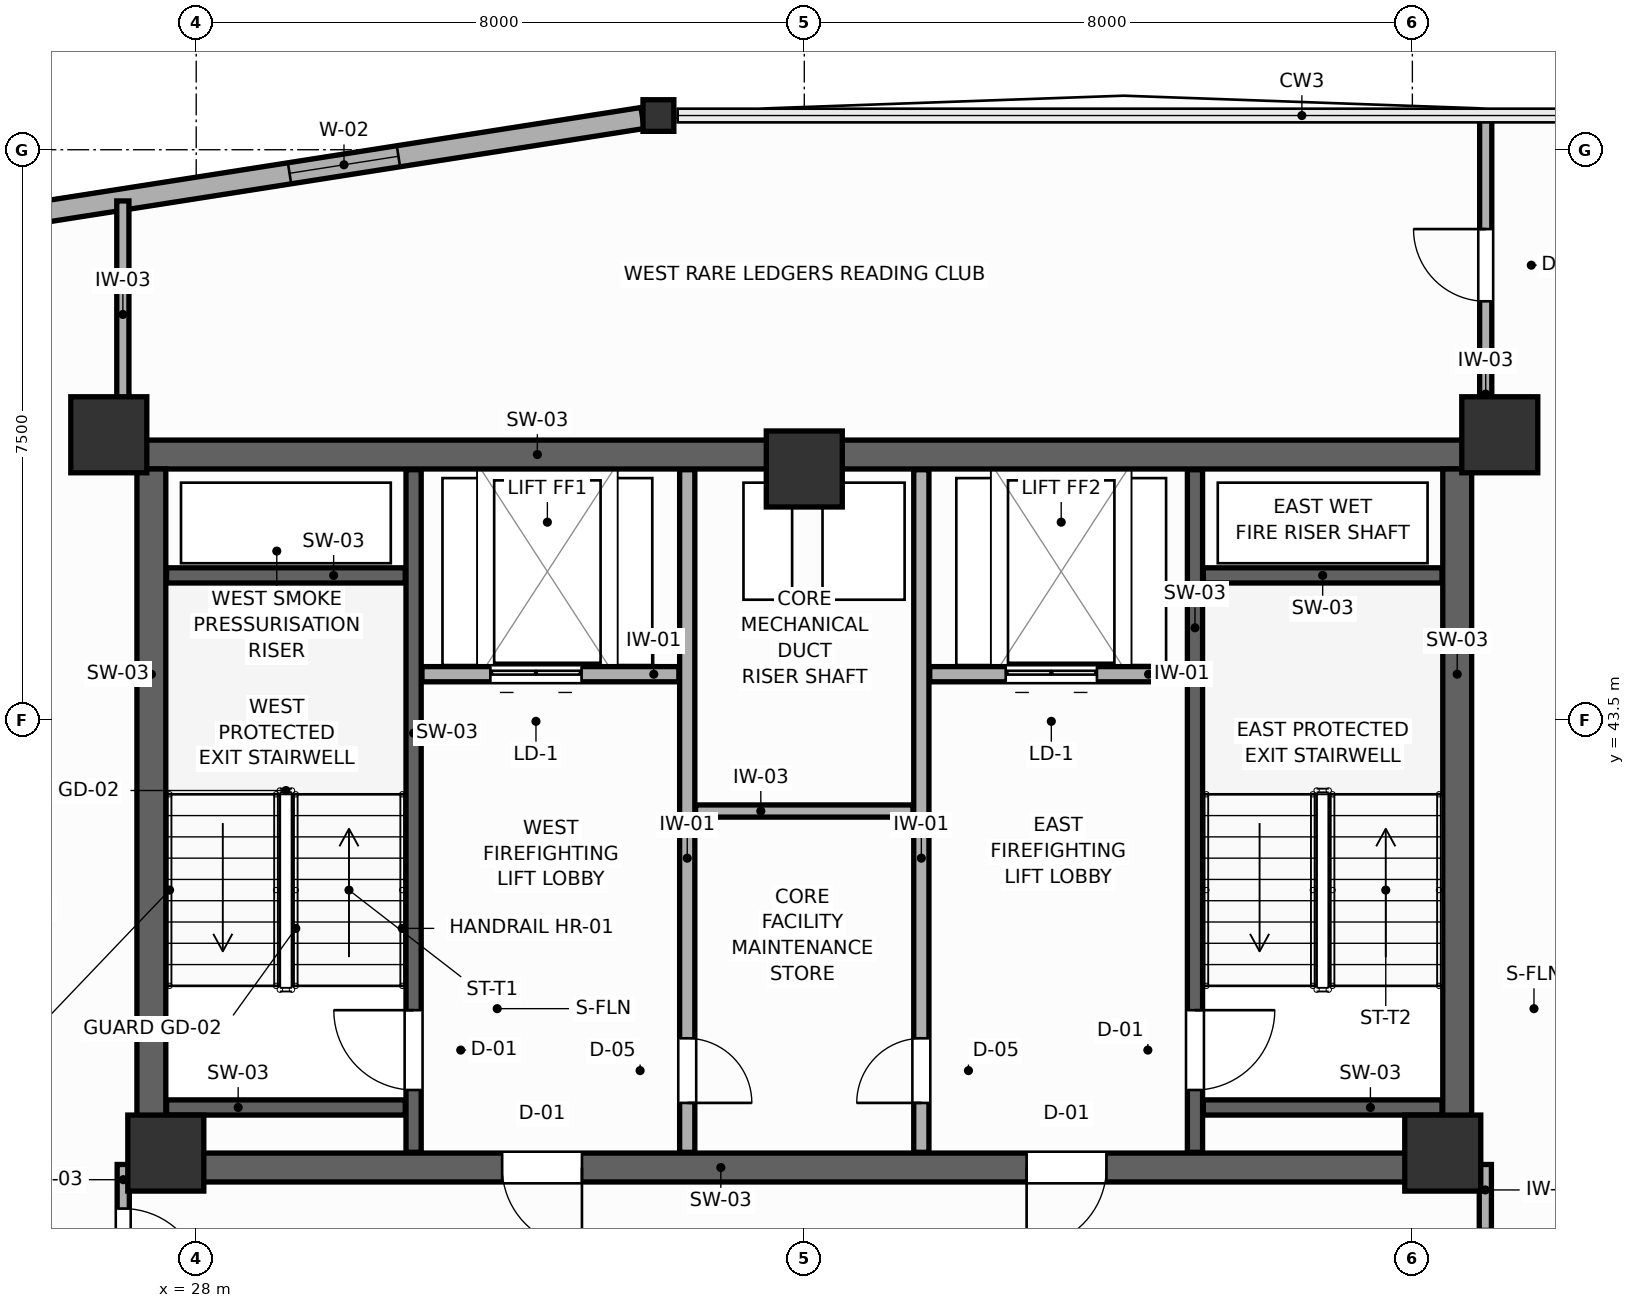
"""IFC4 building model, lengths in metres.
Left out: names, types, materials, properties, quantities, classifications, styles, units other than length and angle.
Written with IfcOpenShell. Run it as: python <this file> out.ifc"""

import sys

from ifc_helpers import new_model, si_unit, direction, frame, frame_2d, origin, origin_2d, place, context, subcontext, project, spatial, rectangle, i_section, extrude, source, transform, mapped, element, fill, save


model = new_model("IFC4")
c1 = context("Model", 3, precision=1e-05, world=origin(), true_north=direction((0.0, 1.0)))
c2 = subcontext(c1, "Body", "Model", "MODEL_VIEW")
j1 = project(units=[si_unit("LENGTHUNIT", "METRE"), si_unit("PLANEANGLEUNIT", "RADIAN")], contexts=[c1])
p1 = place(None, origin())
s1 = spatial("IfcSite", under=j1, at=p1, CompositionType="ELEMENT")
p2 = place(p1, origin())
s2 = spatial("IfcBuilding", under=s1, at=p2, CompositionType="ELEMENT")
p3 = place(p2, frame((0.0, 0.0, 220.2)))
s3 = spatial("IfcBuildingStorey", under=s2, at=p3, CompositionType="ELEMENT", Elevation=220.2)
p4 = place(p3, frame((27.22, 46.99, 0.0), z_axis=(0.0, 0.0, 1.0), x_axis=(1.0, 0.0, 0.0)))
e1 = element("IfcWall", 1, at=p4, inside=s3, PredefinedType="SHEAR", context=c2, shape_type="SweptSolid", body=[
    extrude(rectangle(XDim=17.56, YDim=0.38, at=frame_2d((8.78, 0.0))), origin(), (0.0, 0.0, 1.0), 3.6),
])
p5 = place(p3, frame((27.22, 37.61, 0.0), z_axis=(0.0, 0.0, 1.0), x_axis=(1.0, 0.0, 0.0)))
e2 = element("IfcWall", 2, at=p5, inside=s3, PredefinedType="SHEAR", context=c2, shape_type="SweptSolid", body=[
    extrude(rectangle(XDim=17.56, YDim=0.38, at=frame_2d((8.78, 0.0))), origin(), (0.0, 0.0, 1.0), 3.6),
])
p6 = place(p5, frame((4.805, 0.0, 0.0)))
e3 = element("IfcOpeningElement", 3, at=p6, cuts=e2, PredefinedType="OPENING", context=c2, shape_type="SweptSolid", body=[
    extrude(rectangle(XDim=1.05, YDim=2.1, at=frame_2d((0.525, 1.05))), frame((0.0, 0.2, 0.0), z_axis=(0.0, -1.0, 0.0), x_axis=(1.0, 0.0, 0.0)), (0.0, 0.0, 1.0), 0.4),
])
p7 = place(p5, frame((11.705, 0.0, 0.0)))
e4 = element("IfcOpeningElement", 4, at=p7, cuts=e2, PredefinedType="OPENING", context=c2, shape_type="SweptSolid", body=[
    extrude(rectangle(XDim=1.05, YDim=2.1, at=frame_2d((0.525, 1.05))), frame((0.0, 0.2, 0.0), z_axis=(0.0, -1.0, 0.0), x_axis=(1.0, 0.0, 0.0)), (0.0, 0.0, 1.0), 0.4),
])
for number, where, z_axis, x_axis in (
    (5, (27.41, 37.8, 0.0), (0.0, 0.0, 1.0), (0.0, 1.0, 0.0)),
    (6, (44.59, 37.8, 0.0), (0.0, 0.0, 1.0), (0.0, 1.0, 0.0)),
):
    element("IfcWall", number, at=place(p3, frame(where, z_axis=z_axis, x_axis=x_axis)), inside=s3, PredefinedType="SHEAR", context=c2, shape_type="SweptSolid", body=[
        extrude(rectangle(XDim=9.0, YDim=0.38, at=frame_2d((4.5, 0.0))), origin(), (0.0, 0.0, 1.0), 3.6),
    ])
m1 = source(origin(), c2, "Body", "SweptSolid", [
    extrude(rectangle(XDim=1.0, YDim=1.0, at=origin_2d()), origin(), (0.0, 0.0, 1.0), 3.6),
])
for number, where, z_axis, x_axis in (
    (7, (26.85, 47.25, 0.0), (0.0, 0.0, 1.0), (1.0, 0.0, 0.0)),
    (8, (45.15, 47.25, 0.0), (0.0, 0.0, 1.0), (1.0, 0.0, 0.0)),
    (9, (27.6, 37.8, 0.0), (0.0, 0.0, 1.0), (1.0, 0.0, 0.0)),
    (10, (44.4, 37.8, 0.0), (0.0, 0.0, 1.0), (1.0, 0.0, 0.0)),
    (11, (36.0, 46.8, 0.0), (0.0, 0.0, 1.0), (1.0, 0.0, 0.0)),
):
    element("IfcColumn", number, at=place(p3, frame(where, z_axis=z_axis, x_axis=x_axis)), inside=s3, PredefinedType="COLUMN", context=c2, shape_type="MappedRepresentation", body=[
        mapped(m1, transform((0.0, 0.0, 0.0), scale=1.0)),
    ])
m2 = source(origin(), c2, "Body", "SweptSolid", [
    extrude(i_section(OverallWidth=0.406, OverallDepth=0.416, WebThickness=0.027, FlangeThickness=0.044, FilletRadius=0.015, at=origin_2d()), origin(), (0.0, 0.0, 1.0), 3.6),
])
p8 = place(p3, frame((34.081, 51.45, 0.0), z_axis=(0.0, 0.0, 1.0), x_axis=(1.0, 0.0, 0.0)))
e12 = element("IfcColumn", 12, at=p8, inside=s3, PredefinedType="COLUMN", context=c2, shape_type="MappedRepresentation", body=[
    mapped(m2, transform((0.0, 0.0, 0.0), scale=1.0)),
])
p9 = place(p3, frame((33.873, 51.417, 0.0), z_axis=(0.0, 0.0, 1.0), x_axis=(-0.987957437721, -0.154725890697, 0.0)))
e13 = element("IfcWall", 13, at=p9, inside=s3, PredefinedType="SOLIDWALL", context=c2, shape_type="SweptSolid", body=[
    extrude(rectangle(XDim=13.657, YDim=0.28, at=frame_2d((6.828, 0.0))), origin(), (0.0, 0.0, 1.0), 2.96),
])
p10 = place(p9, frame((3.252, 0.0, 0.75)))
e14 = element("IfcOpeningElement", 14, at=p10, cuts=e13, PredefinedType="OPENING", context=c2, shape_type="SweptSolid", body=[
    extrude(rectangle(XDim=1.45, YDim=1.65, at=frame_2d((0.725, 0.825))), frame((0.0, 0.15, 0.0), z_axis=(0.0, -1.0, 0.0), x_axis=(1.0, 0.0, 0.0)), (0.0, 0.0, 1.0), 0.3),
])
p11 = place(p3, frame((30.86, 37.81, 0.0), z_axis=(0.0, 0.0, 1.0), x_axis=(0.0, 1.0, 0.0)))
e15 = element("IfcWall", 15, at=p11, inside=s3, PredefinedType="SHEAR", context=c2, shape_type="SweptSolid", body=[
    extrude(rectangle(XDim=8.98, YDim=0.2, at=frame_2d((4.49, 0.0))), origin(), (0.0, 0.0, 1.0), 3.6),
])
p12 = place(p11, frame((0.82, 0.0, 0.0)))
e16 = element("IfcOpeningElement", 16, at=p12, cuts=e15, PredefinedType="OPENING", context=c2, shape_type="SweptSolid", body=[
    extrude(rectangle(XDim=1.05, YDim=2.1, at=frame_2d((0.525, 1.05))), frame((0.0, 0.11, 0.0), z_axis=(0.0, -1.0, 0.0), x_axis=(1.0, 0.0, 0.0)), (0.0, 0.0, 1.0), 0.22),
])
for number, where, z_axis, x_axis in (
    (17, (27.61, 45.4, 0.0), (0.0, 0.0, 1.0), (1.0, 0.0, 0.0)),
    (18, (27.61, 38.4, 0.0), (0.0, 0.0, 1.0), (1.0, 0.0, 0.0)),
):
    element("IfcWall", number, at=place(p3, frame(where, z_axis=z_axis, x_axis=x_axis)), inside=s3, PredefinedType="SHEAR", context=c2, shape_type="SweptSolid", body=[
        extrude(rectangle(XDim=3.14, YDim=0.2, at=frame_2d((1.57, 0.0))), origin(), (0.0, 0.0, 1.0), 3.6),
    ])
p13 = place(p3, frame((41.14, 37.81, 0.0), z_axis=(0.0, 0.0, 1.0), x_axis=(0.0, 1.0, 0.0)))
e19 = element("IfcWall", 19, at=p13, inside=s3, PredefinedType="SHEAR", context=c2, shape_type="SweptSolid", body=[
    extrude(rectangle(XDim=8.98, YDim=0.2, at=frame_2d((4.49, 0.0))), origin(), (0.0, 0.0, 1.0), 3.6),
])
p14 = place(p13, frame((0.82, 0.0, 0.0)))
e20 = element("IfcOpeningElement", 20, at=p14, cuts=e19, PredefinedType="OPENING", context=c2, shape_type="SweptSolid", body=[
    extrude(rectangle(XDim=1.05, YDim=2.1, at=frame_2d((0.525, 1.05))), frame((0.0, 0.11, 0.0), z_axis=(0.0, -1.0, 0.0), x_axis=(1.0, 0.0, 0.0)), (0.0, 0.0, 1.0), 0.22),
])
for number, where, z_axis, x_axis in (
    (21, (41.25, 45.4, 0.0), (0.0, 0.0, 1.0), (1.0, 0.0, 0.0)),
    (22, (41.25, 38.4, 0.0), (0.0, 0.0, 1.0), (1.0, 0.0, 0.0)),
):
    element("IfcWall", number, at=place(p3, frame(where, z_axis=z_axis, x_axis=x_axis)), inside=s3, PredefinedType="SHEAR", context=c2, shape_type="SweptSolid", body=[
        extrude(rectangle(XDim=3.14, YDim=0.2, at=frame_2d((1.57, 0.0))), origin(), (0.0, 0.0, 1.0), 3.6),
    ])
p15 = place(p3, frame((30.97, 44.1, 0.0), z_axis=(0.0, 0.0, 1.0), x_axis=(1.0, 0.0, 0.0)))
e23 = element("IfcWall", 23, at=p15, inside=s3, PredefinedType="PARTITIONING", context=c2, shape_type="SweptSolid", body=[
    extrude(rectangle(XDim=3.38, YDim=0.2, at=frame_2d((1.69, 0.0))), origin(), (0.0, 0.0, 1.0), 3.41),
])
p16 = place(p15, frame((0.9, 0.0, 0.0)))
e24 = element("IfcOpeningElement", 24, at=p16, cuts=e23, PredefinedType="OPENING", context=c2, shape_type="SweptSolid", body=[
    extrude(rectangle(XDim=1.2, YDim=2.1, at=frame_2d((0.6, 1.05))), frame((0.0, 0.11, 0.0), z_axis=(0.0, -1.0, 0.0), x_axis=(1.0, 0.0, 0.0)), (0.0, 0.0, 1.0), 0.22),
])
p17 = place(p3, frame((37.65, 44.1, 0.0), z_axis=(0.0, 0.0, 1.0), x_axis=(1.0, 0.0, 0.0)))
e25 = element("IfcWall", 25, at=p17, inside=s3, PredefinedType="PARTITIONING", context=c2, shape_type="SweptSolid", body=[
    extrude(rectangle(XDim=3.38, YDim=0.2, at=frame_2d((1.69, 0.0))), origin(), (0.0, 0.0, 1.0), 3.41),
])
p18 = place(p17, frame((1.0, 0.0, 0.0)))
e26 = element("IfcOpeningElement", 26, at=p18, cuts=e25, PredefinedType="OPENING", context=c2, shape_type="SweptSolid", body=[
    extrude(rectangle(XDim=1.2, YDim=2.1, at=frame_2d((0.6, 1.05))), frame((0.0, 0.11, 0.0), z_axis=(0.0, -1.0, 0.0), x_axis=(1.0, 0.0, 0.0)), (0.0, 0.0, 1.0), 0.22),
])
p19 = place(p3, frame((34.46, 37.81, 0.0), z_axis=(0.0, 0.0, 1.0), x_axis=(0.0, 1.0, 0.0)))
e27 = element("IfcWall", 27, at=p19, inside=s3, PredefinedType="PARTITIONING", context=c2, shape_type="SweptSolid", body=[
    extrude(rectangle(XDim=8.98, YDim=0.2, at=frame_2d((4.49, 0.0))), origin(), (0.0, 0.0, 1.0), 3.41),
])
p20 = place(p19, frame((0.65, 0.0, 0.0)))
e28 = element("IfcOpeningElement", 28, at=p20, cuts=e27, PredefinedType="OPENING", context=c2, shape_type="SweptSolid", body=[
    extrude(rectangle(XDim=0.85, YDim=2.05, at=frame_2d((0.425, 1.025))), frame((0.0, 0.11, 0.0), z_axis=(0.0, -1.0, 0.0), x_axis=(1.0, 0.0, 0.0)), (0.0, 0.0, 1.0), 0.22),
])
p21 = place(p3, frame((37.54, 37.81, 0.0), z_axis=(0.0, 0.0, 1.0), x_axis=(0.0, 1.0, 0.0)))
e29 = element("IfcWall", 29, at=p21, inside=s3, PredefinedType="PARTITIONING", context=c2, shape_type="SweptSolid", body=[
    extrude(rectangle(XDim=8.98, YDim=0.2, at=frame_2d((4.49, 0.0))), origin(), (0.0, 0.0, 1.0), 3.41),
])
p22 = place(p21, frame((0.65, 0.0, 0.0)))
e30 = element("IfcOpeningElement", 30, at=p22, cuts=e29, PredefinedType="OPENING", context=c2, shape_type="SweptSolid", body=[
    extrude(rectangle(XDim=0.85, YDim=2.05, at=frame_2d((0.425, 1.025))), frame((0.0, 0.11, 0.0), z_axis=(0.0, -1.0, 0.0), x_axis=(1.0, 0.0, 0.0)), (0.0, 0.0, 1.0), 0.22),
])
p23 = place(p3, frame((34.57, 42.3, 0.0), z_axis=(0.0, 0.0, 1.0), x_axis=(1.0, 0.0, 0.0)))
e31 = element("IfcWall", 31, at=p23, inside=s3, PredefinedType="PARTITIONING", context=c2, shape_type="SweptSolid", body=[
    extrude(rectangle(XDim=2.86, YDim=0.16, at=frame_2d((1.43, 0.0))), origin(), (0.0, 0.0, 1.0), 3.41),
])
p24 = place(p3, frame((27.04, 35.54, 0.0), z_axis=(0.0, 0.0, 1.0), x_axis=(0.0, 1.0, 0.0)))
e32 = element("IfcWall", 32, at=p24, inside=s3, PredefinedType="PARTITIONING", context=c2, shape_type="SweptSolid", body=[
    extrude(rectangle(XDim=2.11, YDim=0.16, at=frame_2d((1.055, 0.0))), origin(), (0.0, 0.0, 1.0), 3.41),
])
p25 = place(p24, frame((0.48, 0.0, 0.0)))
e33 = element("IfcOpeningElement", 33, at=p25, cuts=e32, PredefinedType="OPENING", context=c2, shape_type="SweptSolid", body=[
    extrude(rectangle(XDim=1.05, YDim=2.1, at=frame_2d((0.525, 1.05))), frame((0.0, 0.09, 0.0), z_axis=(0.0, -1.0, 0.0), x_axis=(1.0, 0.0, 0.0)), (0.0, 0.0, 1.0), 0.18),
])
p26 = place(p3, frame((44.96, 35.0, 0.0), z_axis=(0.0, 0.0, 1.0), x_axis=(0.0, 1.0, 0.0)))
e34 = element("IfcWall", 34, at=p26, inside=s3, PredefinedType="PARTITIONING", context=c2, shape_type="SweptSolid", body=[
    extrude(rectangle(XDim=2.65, YDim=0.16, at=frame_2d((1.325, 0.0))), origin(), (0.0, 0.0, 1.0), 3.41),
])
p27 = place(p26, frame((0.75, 0.0, 0.0)))
e35 = element("IfcOpeningElement", 35, at=p27, cuts=e34, PredefinedType="OPENING", context=c2, shape_type="SweptSolid", body=[
    extrude(rectangle(XDim=1.05, YDim=2.1, at=frame_2d((0.525, 1.05))), frame((0.0, 0.09, 0.0), z_axis=(0.0, -1.0, 0.0), x_axis=(1.0, 0.0, 0.0)), (0.0, 0.0, 1.0), 0.18),
])
p28 = place(p3, frame((44.965, 47.34, 0.0), z_axis=(0.0, 0.0, 1.0), x_axis=(0.0, 1.0, 0.0)))
e36 = element("IfcWall", 36, at=p28, inside=s3, PredefinedType="PARTITIONING", context=c2, shape_type="SweptSolid", body=[
    extrude(rectangle(XDim=4.09, YDim=0.16, at=frame_2d((2.045, 0.0))), origin(), (0.0, 0.0, 1.0), 3.41),
])
p29 = place(p28, frame((1.666, 0.0, 0.0)))
e37 = element("IfcOpeningElement", 37, at=p29, cuts=e36, PredefinedType="OPENING", context=c2, shape_type="SweptSolid", body=[
    extrude(rectangle(XDim=0.95, YDim=2.05, at=frame_2d((0.475, 1.025))), frame((0.0, 0.09, 0.0), z_axis=(0.0, -1.0, 0.0), x_axis=(1.0, 0.0, 0.0)), (0.0, 0.0, 1.0), 0.18),
])
p30 = place(p3, frame((27.035, 47.34, 0.0), z_axis=(0.0, 0.0, 1.0), x_axis=(0.0, 1.0, 0.0)))
e38 = element("IfcWall", 38, at=p30, inside=s3, PredefinedType="PARTITIONING", context=c2, shape_type="SweptSolid", body=[
    extrude(rectangle(XDim=2.986, YDim=0.16, at=frame_2d((1.493, 0.0))), origin(), (0.0, 0.0, 1.0), 3.41),
])
p31 = place(p10, origin())
e39 = element("IfcWindow", 39, at=p31, inside=s3, PartitioningType="SINGLE_PANEL", PredefinedType="WINDOW", context=c2, shape_type="SweptSolid", body=[
    extrude(rectangle(XDim=1.45, YDim=1.65, at=frame_2d((0.725, 0.825))), frame((0.0, 0.03, 0.0), z_axis=(0.0, -1.0, 0.0), x_axis=(1.0, 0.0, 0.0)), (0.0, 0.0, 1.0), 0.06),
])
fill(e14, e39)
p32 = place(p12, origin())
e40 = element("IfcDoor", 40, at=p32, inside=s3, OperationType="SINGLE_SWING_RIGHT", PredefinedType="DOOR", context=c2, shape_type="SweptSolid", body=[
    extrude(rectangle(XDim=1.05, YDim=2.1, at=frame_2d((0.525, 1.05))), frame((0.0, 0.025, 0.0), z_axis=(0.0, -1.0, 0.0), x_axis=(1.0, 0.0, 0.0)), (0.0, 0.0, 1.0), 0.05),
])
fill(e16, e40)
p33 = place(p14, frame((1.05, 0.0, 0.0), z_axis=(0.0, 0.0, 1.0), x_axis=(-1.0, 0.0, 0.0)))
e41 = element("IfcDoor", 41, at=p33, inside=s3, OperationType="SINGLE_SWING_LEFT", PredefinedType="DOOR", context=c2, shape_type="SweptSolid", body=[
    extrude(rectangle(XDim=1.05, YDim=2.1, at=frame_2d((0.525, 1.05))), frame((0.0, 0.025, 0.0), z_axis=(0.0, -1.0, 0.0), x_axis=(1.0, 0.0, 0.0)), (0.0, 0.0, 1.0), 0.05),
])
fill(e20, e41)
p34 = place(p16, origin())
e42 = element("IfcDoor", 42, at=p34, inside=s3, OperationType="DOUBLE_DOOR_SLIDING", PredefinedType="DOOR", context=c2, shape_type="SweptSolid", body=[
    extrude(rectangle(XDim=1.2, YDim=2.1, at=frame_2d((0.6, 1.05))), frame((0.0, 0.025, 0.0), z_axis=(0.0, -1.0, 0.0), x_axis=(1.0, 0.0, 0.0)), (0.0, 0.0, 1.0), 0.05),
])
fill(e24, e42)
p35 = place(p18, origin())
e43 = element("IfcDoor", 43, at=p35, inside=s3, OperationType="DOUBLE_DOOR_SLIDING", PredefinedType="DOOR", context=c2, shape_type="SweptSolid", body=[
    extrude(rectangle(XDim=1.2, YDim=2.1, at=frame_2d((0.6, 1.05))), frame((0.0, 0.025, 0.0), z_axis=(0.0, -1.0, 0.0), x_axis=(1.0, 0.0, 0.0)), (0.0, 0.0, 1.0), 0.05),
])
fill(e26, e43)
p36 = place(p20, frame((0.85, 0.0, 0.0), z_axis=(0.0, 0.0, 1.0), x_axis=(-1.0, 0.0, 0.0)))
e44 = element("IfcDoor", 44, at=p36, inside=s3, OperationType="SINGLE_SWING_RIGHT", PredefinedType="DOOR", context=c2, shape_type="SweptSolid", body=[
    extrude(rectangle(XDim=0.85, YDim=2.05, at=frame_2d((0.425, 1.025))), frame((0.0, 0.025, 0.0), z_axis=(0.0, -1.0, 0.0), x_axis=(1.0, 0.0, 0.0)), (0.0, 0.0, 1.0), 0.05),
])
fill(e28, e44)
p37 = place(p22, origin())
e45 = element("IfcDoor", 45, at=p37, inside=s3, OperationType="SINGLE_SWING_LEFT", PredefinedType="DOOR", context=c2, shape_type="SweptSolid", body=[
    extrude(rectangle(XDim=0.85, YDim=2.05, at=frame_2d((0.425, 1.025))), frame((0.0, 0.025, 0.0), z_axis=(0.0, -1.0, 0.0), x_axis=(1.0, 0.0, 0.0)), (0.0, 0.0, 1.0), 0.05),
])
fill(e30, e45)
p38 = place(p25, frame((1.05, 0.0, 0.0), z_axis=(0.0, 0.0, 1.0), x_axis=(-1.0, 0.0, 0.0)))
e46 = element("IfcDoor", 46, at=p38, inside=s3, OperationType="SINGLE_SWING_RIGHT", PredefinedType="DOOR", context=c2, shape_type="SweptSolid", body=[
    extrude(rectangle(XDim=1.05, YDim=2.1, at=frame_2d((0.525, 1.05))), frame((0.0, 0.025, 0.0), z_axis=(0.0, -1.0, 0.0), x_axis=(1.0, 0.0, 0.0)), (0.0, 0.0, 1.0), 0.05),
])
fill(e33, e46)
p39 = place(p29, origin())
e47 = element("IfcDoor", 47, at=p39, inside=s3, OperationType="SINGLE_SWING_RIGHT", PredefinedType="DOOR", context=c2, shape_type="SweptSolid", body=[
    extrude(rectangle(XDim=0.95, YDim=2.05, at=frame_2d((0.475, 1.025))), frame((0.0, 0.025, 0.0), z_axis=(0.0, -1.0, 0.0), x_axis=(1.0, 0.0, 0.0)), (0.0, 0.0, 1.0), 0.05),
])
fill(e37, e47)
p40 = place(p6, frame((1.05, 0.0, 0.0), z_axis=(0.0, 0.0, 1.0), x_axis=(-1.0, 0.0, 0.0)))
e48 = element("IfcDoor", 48, at=p40, inside=s3, OperationType="SINGLE_SWING_LEFT", PredefinedType="DOOR", context=c2, shape_type="SweptSolid", body=[
    extrude(rectangle(XDim=1.05, YDim=2.1, at=frame_2d((0.525, 1.05))), frame((0.0, 0.025, 0.0), z_axis=(0.0, -1.0, 0.0), x_axis=(1.0, 0.0, 0.0)), (0.0, 0.0, 1.0), 0.05),
])
fill(e3, e48)
p41 = place(p7, frame((1.05, 0.0, 0.0), z_axis=(0.0, 0.0, 1.0), x_axis=(-1.0, 0.0, 0.0)))
e49 = element("IfcDoor", 49, at=p41, inside=s3, OperationType="SINGLE_SWING_RIGHT", PredefinedType="DOOR", context=c2, shape_type="SweptSolid", body=[
    extrude(rectangle(XDim=1.05, YDim=2.1, at=frame_2d((0.525, 1.05))), frame((0.0, 0.025, 0.0), z_axis=(0.0, -1.0, 0.0), x_axis=(1.0, 0.0, 0.0)), (0.0, 0.0, 1.0), 0.05),
])
fill(e4, e49)
save(model, sys.argv[1])
